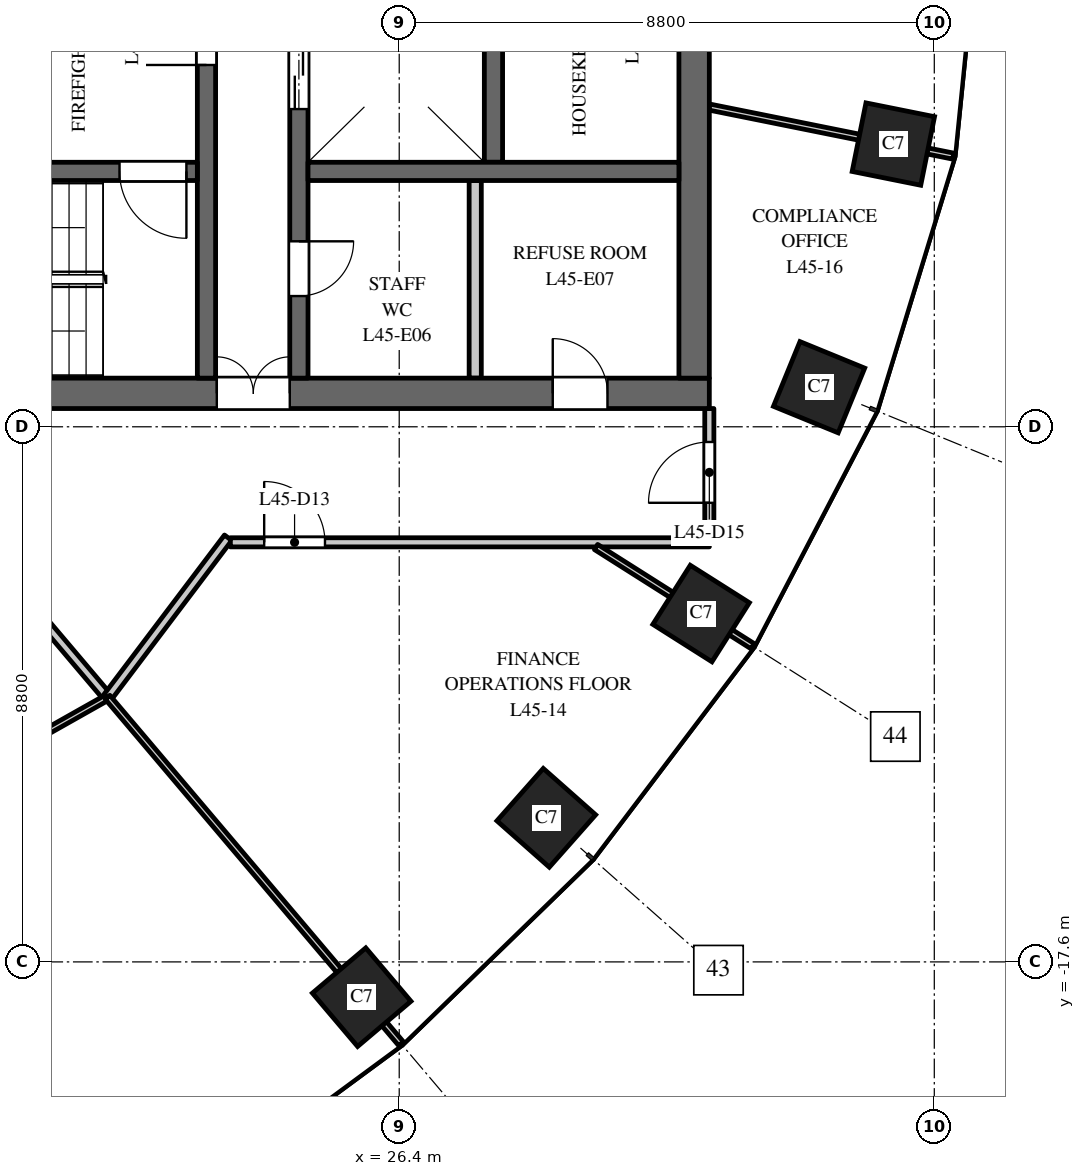
"""IFC4 building model, lengths in metres.
Left out: names, types, materials, properties, quantities, classifications, styles, units other than length and angle.
Written with IfcOpenShell. Run it as: python <this file> out.ifc"""

import sys

from ifc_helpers import new_model, si_unit, direction, frame, frame_2d, origin, origin_2d, place, context, subcontext, project, spatial, rectangle, extrude, element, fill, save


model = new_model("IFC4")
c1 = context("Model", 3, precision=1e-05, world=origin(), true_north=direction((0.0, 1.0)))
c2 = subcontext(c1, "Body", "Model", "MODEL_VIEW")
j1 = project(units=[si_unit("LENGTHUNIT", "METRE"), si_unit("PLANEANGLEUNIT", "RADIAN")], contexts=[c1])
p1 = place(None, origin())
s1 = spatial("IfcSite", under=j1, at=p1, CompositionType="ELEMENT")
p2 = place(p1, origin())
s2 = spatial("IfcBuilding", under=s1, at=p2, CompositionType="ELEMENT")
p3 = place(p2, frame((0.0, 0.0, 194.0)))
s3 = spatial("IfcBuildingStorey", under=s2, at=p3, CompositionType="ELEMENT", Elevation=194.0)
for number, where, z_axis, x_axis in (
    (1, (25.783, -18.18, 0.0), (0.0, 0.0, 1.0), (0.763, 0.646, 0.0)),
    (2, (28.819, -15.23, 0.0), (0.0, 0.0, 1.0), (0.663, 0.749, 0.0)),
    (3, (31.365, -11.871, 0.0), (0.0, 0.0, 1.0), (0.535, 0.845, 0.0)),
    (4, (33.305, -8.149, 0.0), (0.0, 0.0, 1.0), (0.379, 0.925, 0.0)),
    (5, (34.527, -4.151, 0.0), (0.0, 0.0, 1.0), (0.197, 0.98, 0.0)),
):
    element("IfcColumn", number, at=place(p3, frame(where, z_axis=z_axis, x_axis=x_axis)), inside=s3, PredefinedType="COLUMN", context=c2, shape_type="SweptSolid", body=[
        extrude(rectangle(XDim=1.15, YDim=1.15, at=origin_2d()), origin(), (0.0, 0.0, 1.0), 4.0),
    ])
p4 = place(p3, frame((16.5, -8.25, 0.0), z_axis=(0.0, 0.0, 1.0), x_axis=(1.0, 0.0, 0.0)))
e6 = element("IfcWall", 6, at=p4, inside=s3, PredefinedType="SHEAR", context=c2, shape_type="SweptSolid", body=[
    extrude(rectangle(XDim=15.0, YDim=0.5, at=frame_2d((7.5, 0.0))), origin(), (0.0, 0.0, 1.0), 3.7),
])
p5 = place(p4, frame((6.9, 0.0, 0.0)))
e7 = element("IfcOpeningElement", 7, at=p5, cuts=e6, PredefinedType="OPENING", context=c2, shape_type="SweptSolid", body=[
    extrude(rectangle(XDim=1.2, YDim=2.1, at=frame_2d((0.6, 1.05))), frame((0.0, 0.26, 0.0), z_axis=(0.0, -1.0, 0.0), x_axis=(1.0, 0.0, 0.0)), (0.0, 0.0, 1.0), 0.52),
])
p6 = place(p4, frame((12.425, 0.0, 0.0)))
e8 = element("IfcOpeningElement", 8, at=p6, cuts=e6, PredefinedType="OPENING", context=c2, shape_type="SweptSolid", body=[
    extrude(rectangle(XDim=0.9, YDim=2.1, at=frame_2d((0.45, 1.05))), frame((0.0, 0.26, 0.0), z_axis=(0.0, -1.0, 0.0), x_axis=(1.0, 0.0, 0.0)), (0.0, 0.0, 1.0), 0.52),
])
p7 = place(p3, frame((27.95, -4.45, 0.0), z_axis=(0.0, 0.0, 1.0), x_axis=(0.0, 1.0, 0.0)))
e9 = element("IfcWall", 9, at=p7, inside=s3, PredefinedType="SHEAR", context=c2, shape_type="SweptSolid", body=[
    extrude(rectangle(XDim=8.9, YDim=0.3, at=frame_2d((4.45, 0.0))), origin(), (0.0, 0.0, 1.0), 3.7),
])
p8 = place(p3, frame((24.75, -8.0, 0.0), z_axis=(0.0, 0.0, 1.0), x_axis=(0.0, 1.0, 0.0)))
e10 = element("IfcWall", 10, at=p8, inside=s3, PredefinedType="SHEAR", context=c2, shape_type="SweptSolid", body=[
    extrude(rectangle(XDim=16.0, YDim=0.3, at=frame_2d((8.0, 0.0))), origin(), (0.0, 0.0, 1.0), 3.7),
])
p9 = place(p8, frame((4.425, 0.0, 0.0)))
e11 = element("IfcOpeningElement", 11, at=p9, cuts=e10, PredefinedType="OPENING", context=c2, shape_type="SweptSolid", body=[
    extrude(rectangle(XDim=1.1, YDim=2.1, at=frame_2d((0.55, 1.05))), frame((0.0, 0.16, 0.0), z_axis=(0.0, -1.0, 0.0), x_axis=(1.0, 0.0, 0.0)), (0.0, 0.0, 1.0), 0.32),
])
p10 = place(p8, frame((7.45, 0.0, 0.0)))
e12 = element("IfcOpeningElement", 12, at=p10, cuts=e10, PredefinedType="OPENING", context=c2, shape_type="SweptSolid", body=[
    extrude(rectangle(XDim=1.1, YDim=2.1, at=frame_2d((0.55, 1.05))), frame((0.0, 0.16, 0.0), z_axis=(0.0, -1.0, 0.0), x_axis=(1.0, 0.0, 0.0)), (0.0, 0.0, 1.0), 0.32),
])
p11 = place(p8, frame((10.475, 0.0, 0.0)))
e13 = element("IfcOpeningElement", 13, at=p11, cuts=e10, PredefinedType="OPENING", context=c2, shape_type="SweptSolid", body=[
    extrude(rectangle(XDim=1.1, YDim=2.1, at=frame_2d((0.55, 1.05))), frame((0.0, 0.16, 0.0), z_axis=(0.0, -1.0, 0.0), x_axis=(1.0, 0.0, 0.0)), (0.0, 0.0, 1.0), 0.32),
])
p12 = place(p8, frame((13.75, 0.0, 0.0)))
e14 = element("IfcOpeningElement", 14, at=p12, cuts=e10, PredefinedType="OPENING", context=c2, shape_type="SweptSolid", body=[
    extrude(rectangle(XDim=0.9, YDim=2.1, at=frame_2d((0.45, 1.05))), frame((0.0, 0.16, 0.0), z_axis=(0.0, -1.0, 0.0), x_axis=(1.0, 0.0, 0.0)), (0.0, 0.0, 1.0), 0.32),
])
p13 = place(p8, frame((1.35, 0.0, 0.0)))
e15 = element("IfcOpeningElement", 15, at=p13, cuts=e10, PredefinedType="OPENING", context=c2, shape_type="SweptSolid", body=[
    extrude(rectangle(XDim=0.9, YDim=2.1, at=frame_2d((0.45, 1.05))), frame((0.0, 0.16, 0.0), z_axis=(0.0, -1.0, 0.0), x_axis=(1.0, 0.0, 0.0)), (0.0, 0.0, 1.0), 0.32),
])
p14 = place(p3, frame((31.25, -8.0, 0.0), z_axis=(0.0, 0.0, 1.0), x_axis=(0.0, 1.0, 0.0)))
e16 = element("IfcWall", 16, at=p14, inside=s3, PredefinedType="SHEAR", context=c2, shape_type="SweptSolid", body=[
    extrude(rectangle(XDim=16.0, YDim=0.5, at=frame_2d((8.0, 0.0))), origin(), (0.0, 0.0, 1.0), 3.7),
])
p15 = place(p3, frame((27.65, -8.0, 0.0), z_axis=(0.0, 0.0, 1.0), x_axis=(0.0, 1.0, 0.0)))
e17 = element("IfcWall", 17, at=p15, inside=s3, PredefinedType="PARTITIONING", context=c2, shape_type="SweptSolid", body=[
    extrude(rectangle(XDim=3.25, YDim=0.2, at=frame_2d((1.625, 0.0))), origin(), (0.0, 0.0, 1.0), 3.7),
])
p16 = place(p3, frame((24.9, -4.6, 0.0), z_axis=(0.0, 0.0, 1.0), x_axis=(1.0, 0.0, 0.0)))
e18 = element("IfcWall", 18, at=p16, inside=s3, PredefinedType="SHEAR", context=c2, shape_type="SweptSolid", body=[
    extrude(rectangle(XDim=6.1, YDim=0.3, at=frame_2d((3.05, 0.0))), origin(), (0.0, 0.0, 1.0), 3.7),
])
p17 = place(p3, frame((23.23, -8.0, 0.0), z_axis=(0.0, 0.0, 1.0), x_axis=(0.0, 1.0, 0.0)))
e19 = element("IfcWall", 19, at=p17, inside=s3, PredefinedType="SHEAR", context=c2, shape_type="SweptSolid", body=[
    extrude(rectangle(XDim=7.875, YDim=0.3, at=frame_2d((3.938, 0.0))), origin(), (0.0, 0.0, 1.0), 3.7),
])
p18 = place(p17, frame((5.15, 0.0, 0.0)))
e20 = element("IfcOpeningElement", 20, at=p18, cuts=e19, PredefinedType="OPENING", context=c2, shape_type="SweptSolid", body=[
    extrude(rectangle(XDim=1.1, YDim=2.1, at=frame_2d((0.55, 1.05))), frame((0.0, 0.16, 0.0), z_axis=(0.0, -1.0, 0.0), x_axis=(1.0, 0.0, 0.0)), (0.0, 0.0, 1.0), 0.32),
])
p19 = place(p3, frame((16.9, -4.6, 0.0), z_axis=(0.0, 0.0, 1.0), x_axis=(1.0, 0.0, 0.0)))
e21 = element("IfcWall", 21, at=p19, inside=s3, PredefinedType="SHEAR", context=c2, shape_type="SweptSolid", body=[
    extrude(rectangle(XDim=6.18, YDim=0.3, at=frame_2d((3.09, 0.0))), origin(), (0.0, 0.0, 1.0), 3.7),
])
p20 = place(p19, frame((4.9, 0.0, 0.0)))
e22 = element("IfcOpeningElement", 22, at=p20, cuts=e21, PredefinedType="OPENING", context=c2, shape_type="SweptSolid", body=[
    extrude(rectangle(XDim=1.1, YDim=2.1, at=frame_2d((0.55, 1.05))), frame((0.0, 0.16, 0.0), z_axis=(0.0, -1.0, 0.0), x_axis=(1.0, 0.0, 0.0)), (0.0, 0.0, 1.0), 0.32),
])
p21 = place(p3, frame((19.511, -10.778, 0.0), z_axis=(0.0, 0.0, 1.0), x_axis=(0.646314086505, -0.763071491792, 0.0)))
e23 = element("IfcWall", 23, at=p21, inside=s3, PredefinedType="PARTITIONING", context=c2, shape_type="SweptSolid", body=[
    extrude(rectangle(XDim=3.237, YDim=0.15, at=frame_2d((1.618, 0.0))), origin(), (0.0, 0.0, 1.0), 3.7),
])
p22 = place(p3, frame((20.55, -13.842, 0.0), z_axis=(0.0, 0.0, 1.0), x_axis=(0.870976251911, 0.491325114978, 0.0)))
e24 = element("IfcWall", 24, at=p22, inside=s3, PredefinedType="PARTITIONING", context=c2, shape_type="SweptSolid", body=[
    extrude(rectangle(XDim=1.209, YDim=0.1, at=frame_2d((0.604, 0.0))), origin(), (0.0, 0.0, 1.0), 3.7),
])
p23 = place(p3, frame((21.603, -13.248, 0.0), z_axis=(0.0, 0.0, 1.0), x_axis=(0.60303683539, 0.797713341472, 0.0)))
e25 = element("IfcWall", 25, at=p23, inside=s3, PredefinedType="PARTITIONING", context=c2, shape_type="SweptSolid", body=[
    extrude(rectangle(XDim=3.288, YDim=0.15, at=frame_2d((1.644, 0.0))), origin(), (0.0, 0.0, 1.0), 2.75),
])
p24 = place(p3, frame((21.603, -13.248, 0.0), z_axis=(0.0, 0.0, 1.0), x_axis=(0.646437509972, -0.762966936179, 0.0)))
e26 = element("IfcWall", 26, at=p24, inside=s3, PredefinedType="PARTITIONING", context=c2, shape_type="SweptSolid", body=[
    extrude(rectangle(XDim=7.467, YDim=0.1, at=frame_2d((3.733, 0.0))), origin(), (0.0, 0.0, 1.0), 2.9),
])
p25 = place(p3, frame((23.623, -10.7, 0.0), z_axis=(0.0, 0.0, 1.0), x_axis=(1.0, 0.0, 0.0)))
e27 = element("IfcWall", 27, at=p25, inside=s3, PredefinedType="PARTITIONING", context=c2, shape_type="SweptSolid", body=[
    extrude(rectangle(XDim=7.877, YDim=0.15, at=frame_2d((3.938, 0.0))), origin(), (0.0, 0.0, 1.0), 2.9),
])
p26 = place(p25, frame((0.556, 0.0, 0.0)))
e28 = element("IfcOpeningElement", 28, at=p26, cuts=e27, PredefinedType="OPENING", context=c2, shape_type="SweptSolid", body=[
    extrude(rectangle(XDim=1.0, YDim=2.1, at=frame_2d((0.5, 1.05))), frame((0.0, 0.085, 0.0), z_axis=(0.0, -1.0, 0.0), x_axis=(1.0, 0.0, 0.0)), (0.0, 0.0, 1.0), 0.17),
])
p27 = place(p3, frame((29.637, -10.777, 0.0), z_axis=(0.0, 0.0, 1.0), x_axis=(0.844810627195, -0.535065420467, 0.0)))
e29 = element("IfcWall", 29, at=p27, inside=s3, PredefinedType="PARTITIONING", context=c2, shape_type="SweptSolid", body=[
    extrude(rectangle(XDim=3.048, YDim=0.1, at=frame_2d((1.524, 0.0))), origin(), (0.0, 0.0, 1.0), 2.9),
])
p28 = place(p3, frame((31.5, -10.7, 0.0), z_axis=(0.0, 0.0, 1.0), x_axis=(0.0, 1.0, 0.0)))
e30 = element("IfcWall", 30, at=p28, inside=s3, PredefinedType="PARTITIONING", context=c2, shape_type="SweptSolid", body=[
    extrude(rectangle(XDim=2.2, YDim=0.15, at=frame_2d((1.1, 0.0))), origin(), (0.0, 0.0, 1.0), 2.9),
])
p29 = place(p28, frame((0.65, 0.0, 0.0)))
e31 = element("IfcOpeningElement", 31, at=p29, cuts=e30, PredefinedType="OPENING", context=c2, shape_type="SweptSolid", body=[
    extrude(rectangle(XDim=1.0, YDim=2.1, at=frame_2d((0.5, 1.05))), frame((0.0, 0.085, 0.0), z_axis=(0.0, -1.0, 0.0), x_axis=(1.0, 0.0, 0.0)), (0.0, 0.0, 1.0), 0.17),
])
p30 = place(p3, frame((31.5, -3.542, 0.0), z_axis=(0.0, 0.0, 1.0), x_axis=(0.980357474535, -0.197228857227, 0.0)))
e32 = element("IfcWall", 32, at=p30, inside=s3, PredefinedType="PARTITIONING", context=c2, shape_type="SweptSolid", body=[
    extrude(rectangle(XDim=4.092, YDim=0.1, at=frame_2d((2.046, 0.0))), origin(), (0.0, 0.0, 1.0), 2.9),
])
p31 = place(p9, origin())
e33 = element("IfcDoor", 33, at=p31, inside=s3, OperationType="DOUBLE_DOOR_SLIDING", PredefinedType="DOOR", context=c2, shape_type="SweptSolid", body=[
    extrude(rectangle(XDim=1.1, YDim=2.1, at=frame_2d((0.55, 1.05))), frame((0.0, 0.025, 0.0), z_axis=(0.0, -1.0, 0.0), x_axis=(1.0, 0.0, 0.0)), (0.0, 0.0, 1.0), 0.05),
])
fill(e11, e33)
p32 = place(p20, origin())
e34 = element("IfcDoor", 34, at=p32, inside=s3, OperationType="SINGLE_SWING_RIGHT", PredefinedType="DOOR", context=c2, shape_type="SweptSolid", body=[
    extrude(rectangle(XDim=1.1, YDim=2.1, at=frame_2d((0.55, 1.05))), frame((0.0, 0.025, 0.0), z_axis=(0.0, -1.0, 0.0), x_axis=(1.0, 0.0, 0.0)), (0.0, 0.0, 1.0), 0.05),
])
fill(e22, e34)
p33 = place(p18, origin())
e35 = element("IfcDoor", 35, at=p33, inside=s3, OperationType="SINGLE_SWING_RIGHT", PredefinedType="DOOR", context=c2, shape_type="SweptSolid", body=[
    extrude(rectangle(XDim=1.1, YDim=2.1, at=frame_2d((0.55, 1.05))), frame((0.0, 0.025, 0.0), z_axis=(0.0, -1.0, 0.0), x_axis=(1.0, 0.0, 0.0)), (0.0, 0.0, 1.0), 0.05),
])
fill(e20, e35)
p34 = place(p5, origin())
e36 = element("IfcDoor", 36, at=p34, inside=s3, OperationType="DOUBLE_DOOR_DOUBLE_SWING", PredefinedType="DOOR", context=c2, shape_type="SweptSolid", body=[
    extrude(rectangle(XDim=1.2, YDim=2.1, at=frame_2d((0.6, 1.05))), frame((0.0, 0.025, 0.0), z_axis=(0.0, -1.0, 0.0), x_axis=(1.0, 0.0, 0.0)), (0.0, 0.0, 1.0), 0.05),
])
fill(e7, e36)
p35 = place(p13, origin())
e37 = element("IfcDoor", 37, at=p35, inside=s3, OperationType="SINGLE_SWING_RIGHT", PredefinedType="DOOR", context=c2, shape_type="SweptSolid", body=[
    extrude(rectangle(XDim=0.9, YDim=2.1, at=frame_2d((0.45, 1.05))), frame((0.0, 0.025, 0.0), z_axis=(0.0, -1.0, 0.0), x_axis=(1.0, 0.0, 0.0)), (0.0, 0.0, 1.0), 0.05),
])
fill(e15, e37)
p36 = place(p6, origin())
e38 = element("IfcDoor", 38, at=p36, inside=s3, OperationType="SINGLE_SWING_RIGHT", PredefinedType="DOOR", context=c2, shape_type="SweptSolid", body=[
    extrude(rectangle(XDim=0.9, YDim=2.1, at=frame_2d((0.45, 1.05))), frame((0.0, 0.025, 0.0), z_axis=(0.0, -1.0, 0.0), x_axis=(1.0, 0.0, 0.0)), (0.0, 0.0, 1.0), 0.05),
])
fill(e8, e38)
p37 = place(p26, origin())
e39 = element("IfcDoor", 39, at=p37, inside=s3, OperationType="SINGLE_SWING_LEFT", PredefinedType="DOOR", context=c2, shape_type="SweptSolid", body=[
    extrude(rectangle(XDim=1.0, YDim=2.1, at=frame_2d((0.5, 1.05))), frame((0.0, 0.025, 0.0), z_axis=(0.0, -1.0, 0.0), x_axis=(1.0, 0.0, 0.0)), (0.0, 0.0, 1.0), 0.05),
])
fill(e28, e39)
p38 = place(p29, origin())
e40 = element("IfcDoor", 40, at=p38, inside=s3, OperationType="SINGLE_SWING_LEFT", PredefinedType="DOOR", context=c2, shape_type="SweptSolid", body=[
    extrude(rectangle(XDim=1.0, YDim=2.1, at=frame_2d((0.5, 1.05))), frame((0.0, 0.025, 0.0), z_axis=(0.0, -1.0, 0.0), x_axis=(1.0, 0.0, 0.0)), (0.0, 0.0, 1.0), 0.05),
])
fill(e31, e40)
save(model, sys.argv[1])
